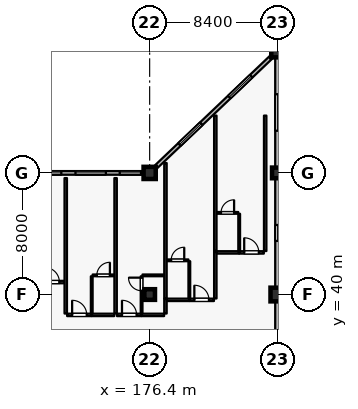
"""IFC4 building model, lengths in metres.
Left out: names, types, materials, properties, quantities, classifications, styles, units other than length and angle.
Written with IfcOpenShell. Run it as: python <this file> out.ifc"""

import sys

from ifc_helpers import new_model, si_unit, direction, frame, frame_2d, origin, origin_2d, place, context, subcontext, project, spatial, rectangle, extrude, element, fill, save


model = new_model("IFC4")
c1 = context("Model", 3, precision=1e-05, world=origin(), true_north=direction((0.0, 1.0)))
c2 = subcontext(c1, "Body", "Model", "MODEL_VIEW")
j1 = project(units=[si_unit("LENGTHUNIT", "METRE"), si_unit("PLANEANGLEUNIT", "RADIAN")], contexts=[c1])
p1 = place(None, origin())
s1 = spatial("IfcSite", under=j1, at=p1, CompositionType="ELEMENT")
p2 = place(p1, origin())
s2 = spatial("IfcBuilding", under=s1, at=p2, CompositionType="ELEMENT")
p3 = place(p2, frame((0.0, 0.0, 16.2)))
s3 = spatial("IfcBuildingStorey", under=s2, at=p3, CompositionType="ELEMENT", Elevation=16.2)
p4 = place(p3, frame((176.4, 48.0, 0.0), z_axis=(0.0, 0.0, 1.0), x_axis=(1.0, 0.0, 0.0)))
e1 = element("IfcColumn", 1, at=p4, inside=s3, PredefinedType="COLUMN", context=c2, shape_type="SweptSolid", body=[
    extrude(rectangle(XDim=0.8, YDim=0.8, at=origin_2d()), origin(), (0.0, 0.0, 1.0), 4.8),
])
p5 = place(p3, frame((184.8, 40.0, 0.0), z_axis=(0.0, 0.0, 1.0), x_axis=(1.0, 0.0, 0.0)))
e2 = element("IfcColumn", 2, at=p5, inside=s3, PredefinedType="COLUMN", context=c2, shape_type="SweptSolid", body=[
    extrude(rectangle(XDim=0.9, YDim=0.9, at=origin_2d()), origin(), (0.0, 0.0, 1.0), 4.8),
])
p6 = place(p3, frame((184.8, 56.0, 0.0), z_axis=(0.0, 0.0, 1.0), x_axis=(1.0, 0.0, 0.0)))
e3 = element("IfcColumn", 3, at=p6, inside=s3, PredefinedType="COLUMN", context=c2, shape_type="SweptSolid", body=[
    extrude(rectangle(XDim=0.8, YDim=0.8, at=origin_2d()), origin(), (0.0, 0.0, 1.0), 4.8),
])
for number, where, z_axis, x_axis in (
    (4, (176.4, 40.0, 0.0), (0.0, 0.0, 1.0), (1.0, 0.0, 0.0)),
    (5, (184.8, 48.0, 0.0), (0.0, 0.0, 1.0), (1.0, 0.0, 0.0)),
):
    element("IfcColumn", number, at=place(p3, frame(where, z_axis=z_axis, x_axis=x_axis)), inside=s3, PredefinedType="COLUMN", context=c2, shape_type="SweptSolid", body=[
        extrude(rectangle(XDim=0.7, YDim=0.7, at=origin_2d()), origin(), (0.0, 0.0, 1.0), 4.8),
    ])
p7 = place(p3, frame((168.4, 48.0, 0.0), z_axis=(0.0, 0.0, 1.0), x_axis=(1.0, 0.0, 0.0)))
e6 = element("IfcWall", 6, at=p7, inside=s3, PredefinedType="SOLIDWALL", context=c2, shape_type="SweptSolid", body=[
    extrude(rectangle(XDim=7.6, YDim=0.24, at=frame_2d((3.8, 0.0))), origin(), (0.0, 0.0, 1.0), 4.13),
])
p8 = place(p7, frame((0.19, 0.0, 0.8)))
e7 = element("IfcOpeningElement", 7, at=p8, cuts=e6, PredefinedType="OPENING", context=c2, shape_type="SweptSolid", body=[
    extrude(rectangle(XDim=2.0, YDim=1.75, at=frame_2d((1.0, 0.875))), frame((0.0, 0.13, 0.0), z_axis=(0.0, -1.0, 0.0), x_axis=(1.0, 0.0, 0.0)), (0.0, 0.0, 1.0), 0.26),
])
p9 = place(p7, frame((3.12, 0.0, 0.8)))
e8 = element("IfcOpeningElement", 8, at=p9, cuts=e6, PredefinedType="OPENING", context=c2, shape_type="SweptSolid", body=[
    extrude(rectangle(XDim=2.0, YDim=1.75, at=frame_2d((1.0, 0.875))), frame((0.0, 0.13, 0.0), z_axis=(0.0, -1.0, 0.0), x_axis=(1.0, 0.0, 0.0)), (0.0, 0.0, 1.0), 0.26),
])
p10 = place(p7, frame((6.03, 0.0, 0.8)))
e9 = element("IfcOpeningElement", 9, at=p10, cuts=e6, PredefinedType="OPENING", context=c2, shape_type="SweptSolid", body=[
    extrude(rectangle(XDim=1.4, YDim=1.6, at=frame_2d((0.7, 0.8))), frame((0.0, 0.13, 0.0), z_axis=(0.0, -1.0, 0.0), x_axis=(1.0, 0.0, 0.0)), (0.0, 0.0, 1.0), 0.26),
])
p11 = place(p3, frame((176.8, 48.381, 0.0), z_axis=(0.0, 0.0, 1.0), x_axis=(0.724145676014, 0.689647040094, 0.0)))
e10 = element("IfcWall", 10, at=p11, inside=s3, PredefinedType="SOLIDWALL", context=c2, shape_type="SweptSolid", body=[
    extrude(rectangle(XDim=10.495, YDim=0.24, at=frame_2d((5.248, 0.0))), origin(), (0.0, 0.0, 1.0), 4.13),
])
p12 = place(p11, frame((2.149, 0.0, 0.8)))
e11 = element("IfcOpeningElement", 11, at=p12, cuts=e10, PredefinedType="OPENING", context=c2, shape_type="SweptSolid", body=[
    extrude(rectangle(XDim=2.0, YDim=1.75, at=frame_2d((1.0, 0.875))), frame((0.0, 0.13, 0.0), z_axis=(0.0, -1.0, 0.0), x_axis=(1.0, 0.0, 0.0)), (0.0, 0.0, 1.0), 0.26),
])
p13 = place(p11, frame((6.678, 0.0, 0.8)))
e12 = element("IfcOpeningElement", 12, at=p13, cuts=e10, PredefinedType="OPENING", context=c2, shape_type="SweptSolid", body=[
    extrude(rectangle(XDim=2.0, YDim=1.75, at=frame_2d((1.0, 0.875))), frame((0.0, 0.13, 0.0), z_axis=(0.0, -1.0, 0.0), x_axis=(1.0, 0.0, 0.0)), (0.0, 0.0, 1.0), 0.26),
])
p14 = place(p3, frame((184.8, 55.6, 0.0), z_axis=(0.0, 0.0, 1.0), x_axis=(0.0, -1.0, 0.0)))
e13 = element("IfcWall", 13, at=p14, inside=s3, PredefinedType="SOLIDWALL", context=c2, shape_type="SweptSolid", body=[
    extrude(rectangle(XDim=7.25, YDim=0.28, at=frame_2d((3.625, 0.0))), origin(), (0.0, 0.0, 1.0), 3.9),
])
p15 = place(p14, frame((2.425, 0.0, 0.75)))
e14 = element("IfcOpeningElement", 14, at=p15, cuts=e13, PredefinedType="OPENING", context=c2, shape_type="SweptSolid", body=[
    extrude(rectangle(XDim=2.4, YDim=1.65, at=frame_2d((1.2, 0.825))), frame((0.0, 0.15, 0.0), z_axis=(0.0, -1.0, 0.0), x_axis=(1.0, 0.0, 0.0)), (0.0, 0.0, 1.0), 0.3),
])
p16 = place(p3, frame((184.8, 47.65, 0.0), z_axis=(0.0, 0.0, 1.0), x_axis=(0.0, -1.0, 0.0)))
e15 = element("IfcWall", 15, at=p16, inside=s3, PredefinedType="SOLIDWALL", context=c2, shape_type="SweptSolid", body=[
    extrude(rectangle(XDim=7.2, YDim=0.28, at=frame_2d((3.6, 0.0))), origin(), (0.0, 0.0, 1.0), 3.9),
])
p17 = place(p16, frame((3.075, 0.0, 0.75)))
e16 = element("IfcOpeningElement", 16, at=p17, cuts=e15, PredefinedType="OPENING", context=c2, shape_type="SweptSolid", body=[
    extrude(rectangle(XDim=1.05, YDim=1.65, at=frame_2d((0.525, 0.825))), frame((0.0, 0.15, 0.0), z_axis=(0.0, -1.0, 0.0), x_axis=(1.0, 0.0, 0.0)), (0.0, 0.0, 1.0), 0.3),
])
p18 = place(p3, frame((184.8, 39.55, 0.0), z_axis=(0.0, 0.0, 1.0), x_axis=(0.0, -1.0, 0.0)))
e17 = element("IfcWall", 17, at=p18, inside=s3, PredefinedType="SOLIDWALL", context=c2, shape_type="SweptSolid", body=[
    extrude(rectangle(XDim=7.2, YDim=0.28, at=frame_2d((3.6, 0.0))), origin(), (0.0, 0.0, 1.0), 3.9),
])
p19 = place(p18, frame((2.4, 0.0, 0.75)))
e18 = element("IfcOpeningElement", 18, at=p19, cuts=e17, PredefinedType="OPENING", context=c2, shape_type="SweptSolid", body=[
    extrude(rectangle(XDim=2.4, YDim=1.65, at=frame_2d((1.2, 0.825))), frame((0.0, 0.15, 0.0), z_axis=(0.0, -1.0, 0.0), x_axis=(1.0, 0.0, 0.0)), (0.0, 0.0, 1.0), 0.3),
])
p20 = place(p3, frame((169.17, 40.82, 0.0), z_axis=(0.0, 0.0, 1.0), x_axis=(1.0, 0.0, 0.0)))
e19 = element("IfcWall", 19, at=p20, inside=s3, PredefinedType="PARTITIONING", context=c2, shape_type="SweptSolid", body=[
    extrude(rectangle(XDim=1.62, YDim=0.16, at=frame_2d((0.81, 0.0))), origin(), (0.0, 0.0, 1.0), 4.535),
])
p21 = place(p20, frame((0.33, 0.0, 0.0)))
e20 = element("IfcOpeningElement", 20, at=p21, cuts=e19, PredefinedType="OPENING", context=c2, shape_type="SweptSolid", body=[
    extrude(rectangle(XDim=0.96, YDim=2.2, at=frame_2d((0.48, 1.1))), frame((0.0, 0.09, 0.0), z_axis=(0.0, -1.0, 0.0), x_axis=(1.0, 0.0, 0.0)), (0.0, 0.0, 1.0), 0.18),
])
p22 = place(p3, frame((170.97, 38.66, 0.0), z_axis=(0.0, 0.0, 1.0), x_axis=(1.0, 0.0, 0.0)))
e21 = element("IfcWall", 21, at=p22, inside=s3, PredefinedType="PARTITIONING", context=c2, shape_type="SweptSolid", body=[
    extrude(rectangle(XDim=1.62, YDim=0.16, at=frame_2d((0.81, 0.0))), origin(), (0.0, 0.0, 1.0), 4.535),
])
p23 = place(p22, frame((0.33, 0.0, 0.0)))
e22 = element("IfcOpeningElement", 22, at=p23, cuts=e21, PredefinedType="OPENING", context=c2, shape_type="SweptSolid", body=[
    extrude(rectangle(XDim=0.96, YDim=2.2, at=frame_2d((0.48, 1.1))), frame((0.0, 0.09, 0.0), z_axis=(0.0, -1.0, 0.0), x_axis=(1.0, 0.0, 0.0)), (0.0, 0.0, 1.0), 0.18),
])
p24 = place(p3, frame((172.6, 38.66, 0.0), z_axis=(0.0, 0.0, 1.0), x_axis=(1.0, 0.0, 0.0)))
e23 = element("IfcWall", 23, at=p24, inside=s3, PredefinedType="PARTITIONING", context=c2, shape_type="SweptSolid", body=[
    extrude(rectangle(XDim=1.47, YDim=0.16, at=frame_2d((0.735, 0.0))), origin(), (0.0, 0.0, 1.0), 4.535),
])
p25 = place(p3, frame((172.59, 38.75, 0.0), z_axis=(0.0, 0.0, 1.0), x_axis=(0.0, 1.0, 0.0)))
e24 = element("IfcWall", 24, at=p25, inside=s3, PredefinedType="PARTITIONING", context=c2, shape_type="SweptSolid", body=[
    extrude(rectangle(XDim=2.45, YDim=0.115, at=frame_2d((1.225, 0.0))), origin(), (0.0, 0.0, 1.0), 4.535),
])
p26 = place(p3, frame((172.65, 41.26, 0.0), z_axis=(0.0, 0.0, 1.0), x_axis=(1.0, 0.0, 0.0)))
e25 = element("IfcWall", 25, at=p26, inside=s3, PredefinedType="PARTITIONING", context=c2, shape_type="SweptSolid", body=[
    extrude(rectangle(XDim=1.41, YDim=0.115, at=frame_2d((0.705, 0.0))), origin(), (0.0, 0.0, 1.0), 4.535),
])
p27 = place(p26, frame((0.275, 0.0, 0.0)))
e26 = element("IfcOpeningElement", 26, at=p27, cuts=e25, PredefinedType="OPENING", context=c2, shape_type="SweptSolid", body=[
    extrude(rectangle(XDim=0.86, YDim=2.12, at=frame_2d((0.43, 1.06))), frame((0.0, 0.067, 0.0), z_axis=(0.0, -1.0, 0.0), x_axis=(1.0, 0.0, 0.0)), (0.0, 0.0, 1.0), 0.135),
])
p28 = place(p3, frame((170.88, 38.75, 0.0), z_axis=(0.0, 0.0, 1.0), x_axis=(0.0, 1.0, 0.0)))
e27 = element("IfcWall", 27, at=p28, inside=s3, PredefinedType="PARTITIONING", context=c2, shape_type="SweptSolid", body=[
    extrude(rectangle(XDim=8.91, YDim=0.16, at=frame_2d((4.455, 0.0))), origin(), (0.0, 0.0, 1.0), 4.535),
])
p29 = place(p3, frame((174.25, 38.66, 0.0), z_axis=(0.0, 0.0, 1.0), x_axis=(1.0, 0.0, 0.0)))
e28 = element("IfcWall", 28, at=p29, inside=s3, PredefinedType="PARTITIONING", context=c2, shape_type="SweptSolid", body=[
    extrude(rectangle(XDim=1.62, YDim=0.16, at=frame_2d((0.81, 0.0))), origin(), (0.0, 0.0, 1.0), 4.535),
])
p30 = place(p29, frame((0.33, 0.0, 0.0)))
e29 = element("IfcOpeningElement", 29, at=p30, cuts=e28, PredefinedType="OPENING", context=c2, shape_type="SweptSolid", body=[
    extrude(rectangle(XDim=0.96, YDim=2.2, at=frame_2d((0.48, 1.1))), frame((0.0, 0.09, 0.0), z_axis=(0.0, -1.0, 0.0), x_axis=(1.0, 0.0, 0.0)), (0.0, 0.0, 1.0), 0.18),
])
p31 = place(p3, frame((175.88, 38.66, 0.0), z_axis=(0.0, 0.0, 1.0), x_axis=(1.0, 0.0, 0.0)))
e30 = element("IfcWall", 30, at=p31, inside=s3, PredefinedType="PARTITIONING", context=c2, shape_type="SweptSolid", body=[
    extrude(rectangle(XDim=1.47, YDim=0.16, at=frame_2d((0.735, 0.0))), origin(), (0.0, 0.0, 1.0), 4.535),
])
p32 = place(p3, frame((175.87, 38.75, 0.0), z_axis=(0.0, 0.0, 1.0), x_axis=(0.0, 1.0, 0.0)))
e31 = element("IfcWall", 31, at=p32, inside=s3, PredefinedType="PARTITIONING", context=c2, shape_type="SweptSolid", body=[
    extrude(rectangle(XDim=2.45, YDim=0.115, at=frame_2d((1.225, 0.0))), origin(), (0.0, 0.0, 1.0), 4.535),
])
p33 = place(p32, frame((1.5, 0.0, 0.0)))
e32 = element("IfcOpeningElement", 32, at=p33, cuts=e31, PredefinedType="OPENING", context=c2, shape_type="SweptSolid", body=[
    extrude(rectangle(XDim=0.86, YDim=2.12, at=frame_2d((0.43, 1.06))), frame((0.0, 0.067, 0.0), z_axis=(0.0, -1.0, 0.0), x_axis=(1.0, 0.0, 0.0)), (0.0, 0.0, 1.0), 0.135),
])
p34 = place(p3, frame((175.93, 41.26, 0.0), z_axis=(0.0, 0.0, 1.0), x_axis=(1.0, 0.0, 0.0)))
e33 = element("IfcWall", 33, at=p34, inside=s3, PredefinedType="PARTITIONING", context=c2, shape_type="SweptSolid", body=[
    extrude(rectangle(XDim=1.41, YDim=0.115, at=frame_2d((0.705, 0.0))), origin(), (0.0, 0.0, 1.0), 4.535),
])
p35 = place(p3, frame((174.16, 38.75, 0.0), z_axis=(0.0, 0.0, 1.0), x_axis=(0.0, 1.0, 0.0)))
e34 = element("IfcWall", 34, at=p35, inside=s3, PredefinedType="PARTITIONING", context=c2, shape_type="SweptSolid", body=[
    extrude(rectangle(XDim=8.91, YDim=0.16, at=frame_2d((4.455, 0.0))), origin(), (0.0, 0.0, 1.0), 4.535),
])
p36 = place(p3, frame((177.44, 38.75, 0.0), z_axis=(0.0, 0.0, 1.0), x_axis=(0.0, 1.0, 0.0)))
e35 = element("IfcWall", 35, at=p36, inside=s3, PredefinedType="PARTITIONING", context=c2, shape_type="SweptSolid", body=[
    extrude(rectangle(XDim=0.98, YDim=0.16, at=frame_2d((0.49, 0.0))), origin(), (0.0, 0.0, 1.0), 4.535),
])
p37 = place(p3, frame((177.53, 39.65, 0.0), z_axis=(0.0, 0.0, 1.0), x_axis=(1.0, 0.0, 0.0)))
e36 = element("IfcWall", 36, at=p37, inside=s3, PredefinedType="PARTITIONING", context=c2, shape_type="SweptSolid", body=[
    extrude(rectangle(XDim=1.47, YDim=0.16, at=frame_2d((0.735, 0.0))), origin(), (0.0, 0.0, 1.0), 4.535),
])
p38 = place(p3, frame((179.01, 39.65, 0.0), z_axis=(0.0, 0.0, 1.0), x_axis=(1.0, 0.0, 0.0)))
e37 = element("IfcWall", 37, at=p38, inside=s3, PredefinedType="PARTITIONING", context=c2, shape_type="SweptSolid", body=[
    extrude(rectangle(XDim=1.62, YDim=0.16, at=frame_2d((0.81, 0.0))), origin(), (0.0, 0.0, 1.0), 4.535),
])
p39 = place(p38, frame((0.33, 0.0, 0.0)))
e38 = element("IfcOpeningElement", 38, at=p39, cuts=e37, PredefinedType="OPENING", context=c2, shape_type="SweptSolid", body=[
    extrude(rectangle(XDim=0.96, YDim=2.2, at=frame_2d((0.48, 1.1))), frame((0.0, 0.09, 0.0), z_axis=(0.0, -1.0, 0.0), x_axis=(1.0, 0.0, 0.0)), (0.0, 0.0, 1.0), 0.18),
])
p40 = place(p3, frame((179.01, 39.74, 0.0), z_axis=(0.0, 0.0, 1.0), x_axis=(0.0, 1.0, 0.0)))
e39 = element("IfcWall", 39, at=p40, inside=s3, PredefinedType="PARTITIONING", context=c2, shape_type="SweptSolid", body=[
    extrude(rectangle(XDim=2.45, YDim=0.115, at=frame_2d((1.225, 0.0))), origin(), (0.0, 0.0, 1.0), 4.535),
])
p41 = place(p3, frame((177.54, 42.25, 0.0), z_axis=(0.0, 0.0, 1.0), x_axis=(1.0, 0.0, 0.0)))
e40 = element("IfcWall", 40, at=p41, inside=s3, PredefinedType="PARTITIONING", context=c2, shape_type="SweptSolid", body=[
    extrude(rectangle(XDim=1.41, YDim=0.115, at=frame_2d((0.705, 0.0))), origin(), (0.0, 0.0, 1.0), 4.535),
])
p42 = place(p41, frame((0.275, 0.0, 0.0)))
e41 = element("IfcOpeningElement", 41, at=p42, cuts=e40, PredefinedType="OPENING", context=c2, shape_type="SweptSolid", body=[
    extrude(rectangle(XDim=0.86, YDim=2.12, at=frame_2d((0.43, 1.06))), frame((0.0, 0.067, 0.0), z_axis=(0.0, -1.0, 0.0), x_axis=(1.0, 0.0, 0.0)), (0.0, 0.0, 1.0), 0.135),
])
p43 = place(p3, frame((177.44, 39.74, 0.0), z_axis=(0.0, 0.0, 1.0), x_axis=(0.0, 1.0, 0.0)))
e42 = element("IfcWall", 42, at=p43, inside=s3, PredefinedType="PARTITIONING", context=c2, shape_type="SweptSolid", body=[
    extrude(rectangle(XDim=8.91, YDim=0.16, at=frame_2d((4.455, 0.0))), origin(), (0.0, 0.0, 1.0), 4.535),
])
p44 = place(p3, frame((180.72, 39.74, 0.0), z_axis=(0.0, 0.0, 1.0), x_axis=(0.0, 1.0, 0.0)))
e43 = element("IfcWall", 43, at=p44, inside=s3, PredefinedType="PARTITIONING", context=c2, shape_type="SweptSolid", body=[
    extrude(rectangle(XDim=3.11, YDim=0.16, at=frame_2d((1.555, 0.0))), origin(), (0.0, 0.0, 1.0), 4.535),
])
p45 = place(p3, frame((180.81, 42.77, 0.0), z_axis=(0.0, 0.0, 1.0), x_axis=(1.0, 0.0, 0.0)))
e44 = element("IfcWall", 44, at=p45, inside=s3, PredefinedType="PARTITIONING", context=c2, shape_type="SweptSolid", body=[
    extrude(rectangle(XDim=1.47, YDim=0.16, at=frame_2d((0.735, 0.0))), origin(), (0.0, 0.0, 1.0), 4.535),
])
p46 = place(p3, frame((182.29, 42.77, 0.0), z_axis=(0.0, 0.0, 1.0), x_axis=(1.0, 0.0, 0.0)))
e45 = element("IfcWall", 45, at=p46, inside=s3, PredefinedType="PARTITIONING", context=c2, shape_type="SweptSolid", body=[
    extrude(rectangle(XDim=1.62, YDim=0.16, at=frame_2d((0.81, 0.0))), origin(), (0.0, 0.0, 1.0), 4.535),
])
p47 = place(p46, frame((0.33, 0.0, 0.0)))
e46 = element("IfcOpeningElement", 46, at=p47, cuts=e45, PredefinedType="OPENING", context=c2, shape_type="SweptSolid", body=[
    extrude(rectangle(XDim=0.96, YDim=2.2, at=frame_2d((0.48, 1.1))), frame((0.0, 0.09, 0.0), z_axis=(0.0, -1.0, 0.0), x_axis=(1.0, 0.0, 0.0)), (0.0, 0.0, 1.0), 0.18),
])
p48 = place(p3, frame((182.29, 42.86, 0.0), z_axis=(0.0, 0.0, 1.0), x_axis=(0.0, 1.0, 0.0)))
e47 = element("IfcWall", 47, at=p48, inside=s3, PredefinedType="PARTITIONING", context=c2, shape_type="SweptSolid", body=[
    extrude(rectangle(XDim=2.45, YDim=0.115, at=frame_2d((1.225, 0.0))), origin(), (0.0, 0.0, 1.0), 4.535),
])
p49 = place(p3, frame((180.82, 45.37, 0.0), z_axis=(0.0, 0.0, 1.0), x_axis=(1.0, 0.0, 0.0)))
e48 = element("IfcWall", 48, at=p49, inside=s3, PredefinedType="PARTITIONING", context=c2, shape_type="SweptSolid", body=[
    extrude(rectangle(XDim=1.41, YDim=0.115, at=frame_2d((0.705, 0.0))), origin(), (0.0, 0.0, 1.0), 4.535),
])
p50 = place(p49, frame((0.275, 0.0, 0.0)))
e49 = element("IfcOpeningElement", 49, at=p50, cuts=e48, PredefinedType="OPENING", context=c2, shape_type="SweptSolid", body=[
    extrude(rectangle(XDim=0.86, YDim=2.12, at=frame_2d((0.43, 1.06))), frame((0.0, 0.067, 0.0), z_axis=(0.0, -1.0, 0.0), x_axis=(1.0, 0.0, 0.0)), (0.0, 0.0, 1.0), 0.135),
])
for number, where, z_axis, x_axis in (
    (50, (180.72, 42.86, 0.0), (0.0, 0.0, 1.0), (0.0, 1.0, 0.0)),
    (51, (184.0, 42.86, 0.0), (0.0, 0.0, 1.0), (0.0, 1.0, 0.0)),
):
    element("IfcWall", number, at=place(p3, frame(where, z_axis=z_axis, x_axis=x_axis)), inside=s3, PredefinedType="PARTITIONING", context=c2, shape_type="SweptSolid", body=[
        extrude(rectangle(XDim=8.91, YDim=0.16, at=frame_2d((4.455, 0.0))), origin(), (0.0, 0.0, 1.0), 4.535),
    ])
p51 = place(p8, origin())
e52 = element("IfcWindow", 52, at=p51, inside=s3, PartitioningType="DOUBLE_PANEL_VERTICAL", PredefinedType="WINDOW", context=c2, shape_type="SweptSolid", body=[
    extrude(rectangle(XDim=2.0, YDim=1.75, at=frame_2d((1.0, 0.875))), frame((0.0, 0.03, 0.0), z_axis=(0.0, -1.0, 0.0), x_axis=(1.0, 0.0, 0.0)), (0.0, 0.0, 1.0), 0.06),
])
fill(e7, e52)
p52 = place(p9, origin())
e53 = element("IfcWindow", 53, at=p52, inside=s3, PartitioningType="DOUBLE_PANEL_VERTICAL", PredefinedType="WINDOW", context=c2, shape_type="SweptSolid", body=[
    extrude(rectangle(XDim=2.0, YDim=1.75, at=frame_2d((1.0, 0.875))), frame((0.0, 0.03, 0.0), z_axis=(0.0, -1.0, 0.0), x_axis=(1.0, 0.0, 0.0)), (0.0, 0.0, 1.0), 0.06),
])
fill(e8, e53)
p53 = place(p10, origin())
e54 = element("IfcWindow", 54, at=p53, inside=s3, PartitioningType="SINGLE_PANEL", PredefinedType="WINDOW", context=c2, shape_type="SweptSolid", body=[
    extrude(rectangle(XDim=1.4, YDim=1.6, at=frame_2d((0.7, 0.8))), frame((0.0, 0.03, 0.0), z_axis=(0.0, -1.0, 0.0), x_axis=(1.0, 0.0, 0.0)), (0.0, 0.0, 1.0), 0.06),
])
fill(e9, e54)
p54 = place(p12, origin())
e55 = element("IfcWindow", 55, at=p54, inside=s3, PartitioningType="DOUBLE_PANEL_VERTICAL", PredefinedType="WINDOW", context=c2, shape_type="SweptSolid", body=[
    extrude(rectangle(XDim=2.0, YDim=1.75, at=frame_2d((1.0, 0.875))), frame((0.0, 0.03, 0.0), z_axis=(0.0, -1.0, 0.0), x_axis=(1.0, 0.0, 0.0)), (0.0, 0.0, 1.0), 0.06),
])
fill(e11, e55)
p55 = place(p13, origin())
e56 = element("IfcWindow", 56, at=p55, inside=s3, PartitioningType="DOUBLE_PANEL_VERTICAL", PredefinedType="WINDOW", context=c2, shape_type="SweptSolid", body=[
    extrude(rectangle(XDim=2.0, YDim=1.75, at=frame_2d((1.0, 0.875))), frame((0.0, 0.03, 0.0), z_axis=(0.0, -1.0, 0.0), x_axis=(1.0, 0.0, 0.0)), (0.0, 0.0, 1.0), 0.06),
])
fill(e12, e56)
p56 = place(p15, origin())
e57 = element("IfcWindow", 57, at=p56, inside=s3, PartitioningType="DOUBLE_PANEL_VERTICAL", PredefinedType="WINDOW", context=c2, shape_type="SweptSolid", body=[
    extrude(rectangle(XDim=2.4, YDim=1.65, at=frame_2d((1.2, 0.825))), frame((0.0, 0.03, 0.0), z_axis=(0.0, -1.0, 0.0), x_axis=(1.0, 0.0, 0.0)), (0.0, 0.0, 1.0), 0.06),
])
fill(e14, e57)
p57 = place(p17, origin())
e58 = element("IfcWindow", 58, at=p57, inside=s3, PartitioningType="SINGLE_PANEL", PredefinedType="WINDOW", context=c2, shape_type="SweptSolid", body=[
    extrude(rectangle(XDim=1.05, YDim=1.65, at=frame_2d((0.525, 0.825))), frame((0.0, 0.03, 0.0), z_axis=(0.0, -1.0, 0.0), x_axis=(1.0, 0.0, 0.0)), (0.0, 0.0, 1.0), 0.06),
])
fill(e16, e58)
p58 = place(p21, origin())
e59 = element("IfcDoor", 59, at=p58, inside=s3, OperationType="SINGLE_SWING_LEFT", PredefinedType="DOOR", context=c2, shape_type="SweptSolid", body=[
    extrude(rectangle(XDim=0.96, YDim=2.2, at=frame_2d((0.48, 1.1))), frame((0.0, 0.025, 0.0), z_axis=(0.0, -1.0, 0.0), x_axis=(1.0, 0.0, 0.0)), (0.0, 0.0, 1.0), 0.05),
])
fill(e20, e59)
p59 = place(p23, origin())
e60 = element("IfcDoor", 60, at=p59, inside=s3, OperationType="SINGLE_SWING_LEFT", PredefinedType="DOOR", context=c2, shape_type="SweptSolid", body=[
    extrude(rectangle(XDim=0.96, YDim=2.2, at=frame_2d((0.48, 1.1))), frame((0.0, 0.025, 0.0), z_axis=(0.0, -1.0, 0.0), x_axis=(1.0, 0.0, 0.0)), (0.0, 0.0, 1.0), 0.05),
])
fill(e22, e60)
p60 = place(p27, origin())
e61 = element("IfcDoor", 61, at=p60, inside=s3, OperationType="SINGLE_SWING_RIGHT", PredefinedType="DOOR", context=c2, shape_type="SweptSolid", body=[
    extrude(rectangle(XDim=0.86, YDim=2.12, at=frame_2d((0.43, 1.06))), frame((0.0, 0.025, 0.0), z_axis=(0.0, -1.0, 0.0), x_axis=(1.0, 0.0, 0.0)), (0.0, 0.0, 1.0), 0.05),
])
fill(e26, e61)
p61 = place(p30, origin())
e62 = element("IfcDoor", 62, at=p61, inside=s3, OperationType="SINGLE_SWING_LEFT", PredefinedType="DOOR", context=c2, shape_type="SweptSolid", body=[
    extrude(rectangle(XDim=0.96, YDim=2.2, at=frame_2d((0.48, 1.1))), frame((0.0, 0.025, 0.0), z_axis=(0.0, -1.0, 0.0), x_axis=(1.0, 0.0, 0.0)), (0.0, 0.0, 1.0), 0.05),
])
fill(e29, e62)
p62 = place(p33, origin())
e63 = element("IfcDoor", 63, at=p62, inside=s3, OperationType="SINGLE_SWING_RIGHT", PredefinedType="DOOR", context=c2, shape_type="SweptSolid", body=[
    extrude(rectangle(XDim=0.86, YDim=2.12, at=frame_2d((0.43, 1.06))), frame((0.0, 0.025, 0.0), z_axis=(0.0, -1.0, 0.0), x_axis=(1.0, 0.0, 0.0)), (0.0, 0.0, 1.0), 0.05),
])
fill(e32, e63)
p63 = place(p39, origin())
e64 = element("IfcDoor", 64, at=p63, inside=s3, OperationType="SINGLE_SWING_LEFT", PredefinedType="DOOR", context=c2, shape_type="SweptSolid", body=[
    extrude(rectangle(XDim=0.96, YDim=2.2, at=frame_2d((0.48, 1.1))), frame((0.0, 0.025, 0.0), z_axis=(0.0, -1.0, 0.0), x_axis=(1.0, 0.0, 0.0)), (0.0, 0.0, 1.0), 0.05),
])
fill(e38, e64)
p64 = place(p42, origin())
e65 = element("IfcDoor", 65, at=p64, inside=s3, OperationType="SINGLE_SWING_RIGHT", PredefinedType="DOOR", context=c2, shape_type="SweptSolid", body=[
    extrude(rectangle(XDim=0.86, YDim=2.12, at=frame_2d((0.43, 1.06))), frame((0.0, 0.025, 0.0), z_axis=(0.0, -1.0, 0.0), x_axis=(1.0, 0.0, 0.0)), (0.0, 0.0, 1.0), 0.05),
])
fill(e41, e65)
p65 = place(p47, origin())
e66 = element("IfcDoor", 66, at=p65, inside=s3, OperationType="SINGLE_SWING_LEFT", PredefinedType="DOOR", context=c2, shape_type="SweptSolid", body=[
    extrude(rectangle(XDim=0.96, YDim=2.2, at=frame_2d((0.48, 1.1))), frame((0.0, 0.025, 0.0), z_axis=(0.0, -1.0, 0.0), x_axis=(1.0, 0.0, 0.0)), (0.0, 0.0, 1.0), 0.05),
])
fill(e46, e66)
p66 = place(p50, origin())
e67 = element("IfcDoor", 67, at=p66, inside=s3, OperationType="SINGLE_SWING_RIGHT", PredefinedType="DOOR", context=c2, shape_type="SweptSolid", body=[
    extrude(rectangle(XDim=0.86, YDim=2.12, at=frame_2d((0.43, 1.06))), frame((0.0, 0.025, 0.0), z_axis=(0.0, -1.0, 0.0), x_axis=(1.0, 0.0, 0.0)), (0.0, 0.0, 1.0), 0.05),
])
fill(e49, e67)
save(model, sys.argv[1])
